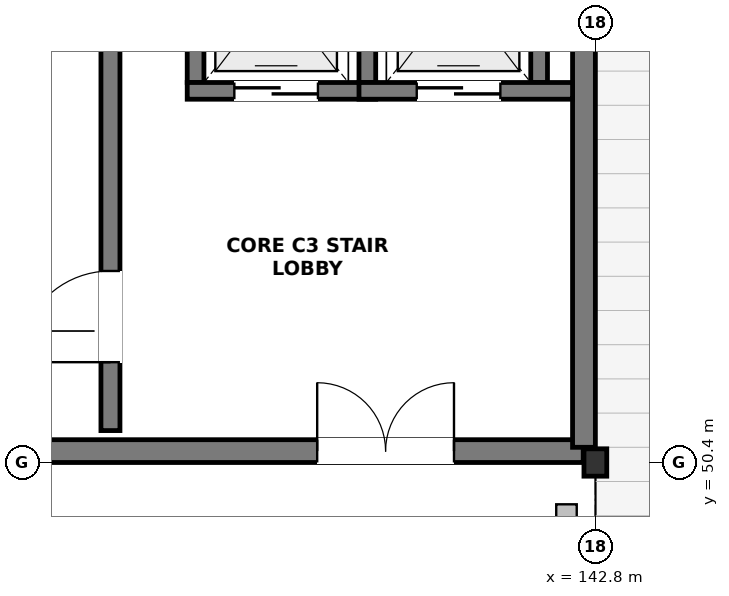
"""IFC4 building model, lengths in metres.
Left out: names, types, materials, properties, quantities, classifications, styles, units other than length and angle.
Written with IfcOpenShell. Run it as: python <this file> out.ifc"""

import sys

from ifc_helpers import new_model, si_unit, direction, frame, frame_2d, origin, origin_2d, place, context, subcontext, project, spatial, rectangle, i_section, extrude, element, fill, save


model = new_model("IFC4")
c1 = context("Model", 3, precision=1e-05, world=origin(), true_north=direction((0.0, 1.0)))
c2 = subcontext(c1, "Body", "Model", "MODEL_VIEW")
j1 = project(units=[si_unit("LENGTHUNIT", "METRE"), si_unit("PLANEANGLEUNIT", "RADIAN")], contexts=[c1])
p1 = place(None, origin())
s1 = spatial("IfcSite", under=j1, at=p1, CompositionType="ELEMENT")
p2 = place(p1, origin())
s2 = spatial("IfcBuilding", under=s1, at=p2, CompositionType="ELEMENT")
p3 = place(p2, frame((0.0, 0.0, 21.6)))
s3 = spatial("IfcBuildingStorey", under=s2, at=p3, CompositionType="ELEMENT", Elevation=21.6)
p4 = place(p3, frame((142.8, 50.4, 0.0), z_axis=(0.0, 0.0, 1.0), x_axis=(1.0, 0.0, 0.0)))
e1 = element("IfcColumn", 1, at=p4, inside=s3, PredefinedType="COLUMN", context=c2, shape_type="SweptSolid", body=[
    extrude(i_section(OverallWidth=0.3, OverallDepth=0.36, WebThickness=0.012, FlangeThickness=0.022, FilletRadius=0.027, at=origin_2d()), origin(), (0.0, 0.0, 1.0), 3.9),
])
p5 = place(p3, frame((142.42, 49.85, 0.0), z_axis=(0.0, 0.0, 1.0), x_axis=(0.0, -1.0, 0.0)))
e2 = element("IfcWall", 2, at=p5, inside=s3, PredefinedType="SOLIDWALL", context=c2, shape_type="SweptSolid", body=[
    extrude(rectangle(XDim=7.611, YDim=0.27, at=frame_2d((3.806, 0.0))), origin(), (0.0, 0.0, 1.0), 3.24),
])
p6 = place(p5, frame((2.906, 0.0, 0.85)))
e3 = element("IfcOpeningElement", 3, at=p6, cuts=e2, PredefinedType="OPENING", context=c2, shape_type="SweptSolid", body=[
    extrude(rectangle(XDim=1.8, YDim=1.4, at=frame_2d((0.9, 0.7))), frame((0.0, 0.147, 0.0), z_axis=(0.0, -1.0, 0.0), x_axis=(1.0, 0.0, 0.0)), (0.0, 0.0, 1.0), 0.294),
])
p7 = place(p3, frame((126.165, 50.55, 0.0), z_axis=(0.0, 0.0, 1.0), x_axis=(1.0, 0.0, 0.0)))
e4 = element("IfcWall", 4, at=p7, inside=s3, PredefinedType="SHEAR", context=c2, shape_type="SweptSolid", body=[
    extrude(rectangle(XDim=16.475, YDim=0.3, at=frame_2d((8.237, 0.0))), origin(), (0.0, 0.0, 1.0), 3.64),
])
p8 = place(p7, frame((12.975, 0.0, 0.0)))
e5 = element("IfcOpeningElement", 5, at=p8, cuts=e4, PredefinedType="OPENING", context=c2, shape_type="SweptSolid", body=[
    extrude(rectangle(XDim=1.8, YDim=2.2, at=frame_2d((0.9, 1.1))), frame((0.0, 0.162, 0.0), z_axis=(0.0, -1.0, 0.0), x_axis=(1.0, 0.0, 0.0)), (0.0, 0.0, 1.0), 0.324),
])
p9 = place(p3, frame((142.65, 50.6, 0.0), z_axis=(0.0, 0.0, 1.0), x_axis=(0.0, 1.0, 0.0)))
e6 = element("IfcWall", 6, at=p9, inside=s3, PredefinedType="SHEAR", context=c2, shape_type="SweptSolid", body=[
    extrude(rectangle(XDim=8.0, YDim=0.3, at=frame_2d((4.0, 0.0))), origin(), (0.0, 0.0, 1.0), 3.64),
])
p10 = place(p3, frame((136.42, 50.82, 0.0), z_axis=(0.0, 0.0, 1.0), x_axis=(0.0, 1.0, 0.0)))
e7 = element("IfcWall", 7, at=p10, inside=s3, PredefinedType="SHEAR", context=c2, shape_type="SweptSolid", body=[
    extrude(rectangle(XDim=7.56, YDim=0.25, at=frame_2d((3.78, 0.0))), origin(), (0.0, 0.0, 1.0), 3.64),
])
p11 = place(p10, frame((0.9, 0.0, 0.0)))
e8 = element("IfcOpeningElement", 8, at=p11, cuts=e7, PredefinedType="OPENING", context=c2, shape_type="SweptSolid", body=[
    extrude(rectangle(XDim=1.2, YDim=2.2, at=frame_2d((0.6, 1.1))), frame((0.0, 0.137, 0.0), z_axis=(0.0, -1.0, 0.0), x_axis=(1.0, 0.0, 0.0)), (0.0, 0.0, 1.0), 0.274),
])
p12 = place(p3, frame((137.54, 55.4, 0.0), z_axis=(0.0, 0.0, 1.0), x_axis=(0.0, 1.0, 0.0)))
e9 = element("IfcWall", 9, at=p12, inside=s3, PredefinedType="SOLIDWALL", context=c2, shape_type="SweptSolid", body=[
    extrude(rectangle(XDim=2.4, YDim=0.22, at=frame_2d((1.2, 0.0))), origin(), (0.0, 0.0, 1.0), 3.64),
])
p13 = place(p3, frame((137.43, 55.29, 0.0), z_axis=(0.0, 0.0, 1.0), x_axis=(1.0, 0.0, 0.0)))
e10 = element("IfcWall", 10, at=p13, inside=s3, PredefinedType="SOLIDWALL", context=c2, shape_type="SweptSolid", body=[
    extrude(rectangle(XDim=2.48, YDim=0.22, at=frame_2d((1.24, 0.0))), origin(), (0.0, 0.0, 1.0), 3.64),
])
p14 = place(p13, frame((0.62, 0.0, 0.0)))
e11 = element("IfcOpeningElement", 11, at=p14, cuts=e10, PredefinedType="OPENING", context=c2, shape_type="SweptSolid", body=[
    extrude(rectangle(XDim=1.1, YDim=2.15, at=frame_2d((0.55, 1.075))), frame((0.0, 0.122, 0.0), z_axis=(0.0, -1.0, 0.0), x_axis=(1.0, 0.0, 0.0)), (0.0, 0.0, 1.0), 0.244),
])
for number, where, z_axis, x_axis in (
    (12, (139.8, 55.4, 0.0), (0.0, 0.0, 1.0), (0.0, 1.0, 0.0)),
    (13, (142.06, 55.4, 0.0), (0.0, 0.0, 1.0), (0.0, 1.0, 0.0)),
):
    element("IfcWall", number, at=place(p3, frame(where, z_axis=z_axis, x_axis=x_axis)), inside=s3, PredefinedType="SOLIDWALL", context=c2, shape_type="SweptSolid", body=[
        extrude(rectangle(XDim=2.4, YDim=0.22, at=frame_2d((1.2, 0.0))), origin(), (0.0, 0.0, 1.0), 3.64),
    ])
p15 = place(p3, frame((139.69, 55.29, 0.0), z_axis=(0.0, 0.0, 1.0), x_axis=(1.0, 0.0, 0.0)))
e14 = element("IfcWall", 14, at=p15, inside=s3, PredefinedType="SOLIDWALL", context=c2, shape_type="SweptSolid", body=[
    extrude(rectangle(XDim=2.81, YDim=0.22, at=frame_2d((1.405, 0.0))), origin(), (0.0, 0.0, 1.0), 3.64),
])
p16 = place(p15, frame((0.76, 0.0, 0.0)))
e15 = element("IfcOpeningElement", 15, at=p16, cuts=e14, PredefinedType="OPENING", context=c2, shape_type="SweptSolid", body=[
    extrude(rectangle(XDim=1.1, YDim=2.15, at=frame_2d((0.55, 1.075))), frame((0.0, 0.122, 0.0), z_axis=(0.0, -1.0, 0.0), x_axis=(1.0, 0.0, 0.0)), (0.0, 0.0, 1.0), 0.244),
])
p17 = place(p8, origin())
e16 = element("IfcDoor", 16, at=p17, inside=s3, OperationType="DOUBLE_DOOR_SINGLE_SWING", PredefinedType="DOOR", context=c2, shape_type="SweptSolid", body=[
    extrude(rectangle(XDim=1.8, YDim=2.2, at=frame_2d((0.9, 1.1))), frame((0.0, 0.025, 0.0), z_axis=(0.0, -1.0, 0.0), x_axis=(1.0, 0.0, 0.0)), (0.0, 0.0, 1.0), 0.05),
])
fill(e5, e16)
p18 = place(p11, origin())
e17 = element("IfcDoor", 17, at=p18, inside=s3, OperationType="SINGLE_SWING_LEFT", PredefinedType="DOOR", context=c2, shape_type="SweptSolid", body=[
    extrude(rectangle(XDim=1.2, YDim=2.2, at=frame_2d((0.6, 1.1))), frame((0.0, 0.025, 0.0), z_axis=(0.0, -1.0, 0.0), x_axis=(1.0, 0.0, 0.0)), (0.0, 0.0, 1.0), 0.05),
])
fill(e8, e17)
p19 = place(p14, origin())
e18 = element("IfcDoor", 18, at=p19, inside=s3, OperationType="DOUBLE_DOOR_SLIDING", PredefinedType="DOOR", context=c2, shape_type="SweptSolid", body=[
    extrude(rectangle(XDim=1.1, YDim=2.15, at=frame_2d((0.55, 1.075))), frame((0.0, 0.025, 0.0), z_axis=(0.0, -1.0, 0.0), x_axis=(1.0, 0.0, 0.0)), (0.0, 0.0, 1.0), 0.05),
])
fill(e11, e18)
p20 = place(p16, origin())
e19 = element("IfcDoor", 19, at=p20, inside=s3, OperationType="DOUBLE_DOOR_SLIDING", PredefinedType="DOOR", context=c2, shape_type="SweptSolid", body=[
    extrude(rectangle(XDim=1.1, YDim=2.15, at=frame_2d((0.55, 1.075))), frame((0.0, 0.025, 0.0), z_axis=(0.0, -1.0, 0.0), x_axis=(1.0, 0.0, 0.0)), (0.0, 0.0, 1.0), 0.05),
])
fill(e15, e19)
save(model, sys.argv[1])
